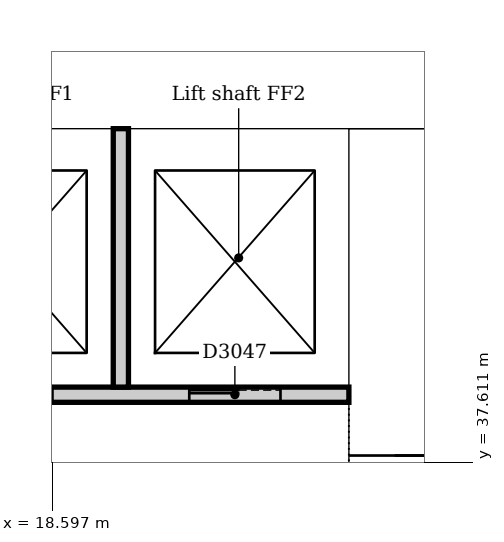
"""IFC4 building model, lengths in metres.
Left out: names, types, materials, properties, quantities, classifications, styles, units other than length and angle.
Written with IfcOpenShell. Run it as: python <this file> out.ifc"""

import sys

from ifc_helpers import new_model, si_unit, direction, frame, frame_2d, origin, place, context, subcontext, project, spatial, rectangle, extrude, element, fill, save


model = new_model("IFC4")
c1 = context("Model", 3, precision=1e-05, world=origin(), true_north=direction((0.0, 1.0)))
c2 = subcontext(c1, "Body", "Model", "MODEL_VIEW")
j1 = project(units=[si_unit("LENGTHUNIT", "METRE"), si_unit("PLANEANGLEUNIT", "RADIAN")], contexts=[c1])
p1 = place(None, origin())
s1 = spatial("IfcSite", under=j1, at=p1, CompositionType="ELEMENT")
p2 = place(p1, origin())
s2 = spatial("IfcBuilding", under=s1, at=p2, CompositionType="ELEMENT")
p3 = place(p2, frame((0.0, 0.0, -5.0)))
s3 = spatial("IfcBuildingStorey", under=s2, at=p3, CompositionType="ELEMENT", Elevation=-5.0)
p4 = place(p3, frame((23.7, 42.6, 0.0), z_axis=(0.0, 0.0, 1.0), x_axis=(-1.0, 0.0, 0.0)))
e1 = element("IfcWall", 1, at=p4, inside=s3, PredefinedType="SOLIDWALL", context=c2, shape_type="SweptSolid", body=[
    extrude(rectangle(XDim=19.8, YDim=1.2, at=frame_2d((9.9, 0.0))), origin(), (0.0, 0.0, 1.0), 5.0),
])
p5 = place(p3, frame((23.1, 31.5, 0.0), z_axis=(0.0, 0.0, 1.0), x_axis=(0.0, 1.0, 0.0)))
e2 = element("IfcWall", 2, at=p5, inside=s3, PredefinedType="SOLIDWALL", context=c2, shape_type="SweptSolid", body=[
    extrude(rectangle(XDim=10.5, YDim=1.2, at=frame_2d((5.25, 0.0))), origin(), (0.0, 0.0, 1.0), 5.0),
])
p6 = place(p5, frame((3.15, 0.0, 0.0)))
e3 = element("IfcOpeningElement", 3, at=p6, cuts=e2, PredefinedType="OPENING", context=c2, shape_type="SweptSolid", body=[
    extrude(rectangle(XDim=1.0, YDim=2.1, at=frame_2d((0.5, 1.05))), frame((0.0, 0.61, 0.0), z_axis=(0.0, -1.0, 0.0), x_axis=(1.0, 0.0, 0.0)), (0.0, 0.0, 1.0), 1.22),
])
p7 = place(p5, frame((5.2, 0.0, 0.0)))
e4 = element("IfcOpeningElement", 4, at=p7, cuts=e2, PredefinedType="OPENING", context=c2, shape_type="SweptSolid", body=[
    extrude(rectangle(XDim=1.0, YDim=2.1, at=frame_2d((0.5, 1.05))), frame((0.0, 0.61, 0.0), z_axis=(0.0, -1.0, 0.0), x_axis=(1.0, 0.0, 0.0)), (0.0, 0.0, 1.0), 1.22),
])
p8 = place(p3, frame((16.4, 38.5, 0.0), z_axis=(0.0, 0.0, 1.0), x_axis=(1.0, 0.0, 0.0)))
e5 = element("IfcWall", 5, at=p8, inside=s3, PredefinedType="PARTITIONING", context=c2, shape_type="SweptSolid", body=[
    extrude(rectangle(XDim=6.1, YDim=0.2, at=frame_2d((3.05, 0.0))), origin(), (0.0, 0.0, 1.0), 4.7),
])
p9 = place(p8, frame((1.0, 0.0, 0.0)))
e6 = element("IfcOpeningElement", 6, at=p9, cuts=e5, PredefinedType="OPENING", context=c2, shape_type="SweptSolid", body=[
    extrude(rectangle(XDim=1.2, YDim=2.1, at=frame_2d((0.6, 1.05))), frame((0.0, 0.11, 0.0), z_axis=(0.0, -1.0, 0.0), x_axis=(1.0, 0.0, 0.0)), (0.0, 0.0, 1.0), 0.22),
])
p10 = place(p8, frame((4.0, 0.0, 0.0)))
e7 = element("IfcOpeningElement", 7, at=p10, cuts=e5, PredefinedType="OPENING", context=c2, shape_type="SweptSolid", body=[
    extrude(rectangle(XDim=1.2, YDim=2.1, at=frame_2d((0.6, 1.05))), frame((0.0, 0.11, 0.0), z_axis=(0.0, -1.0, 0.0), x_axis=(1.0, 0.0, 0.0)), (0.0, 0.0, 1.0), 0.22),
])
p11 = place(p3, frame((19.5, 38.6, 0.0), z_axis=(0.0, 0.0, 1.0), x_axis=(0.0, 1.0, 0.0)))
e8 = element("IfcWall", 8, at=p11, inside=s3, PredefinedType="PARTITIONING", context=c2, shape_type="SweptSolid", body=[
    extrude(rectangle(XDim=3.4, YDim=0.2, at=frame_2d((1.7, 0.0))), origin(), (0.0, 0.0, 1.0), 4.7),
])
p12 = place(p10, origin())
e9 = element("IfcDoor", 9, at=p12, inside=s3, OperationType="SLIDING_TO_LEFT", PredefinedType="DOOR", context=c2, shape_type="SweptSolid", body=[
    extrude(rectangle(XDim=1.2, YDim=2.1, at=frame_2d((0.6, 1.05))), frame((0.0, 0.025, 0.0), z_axis=(0.0, -1.0, 0.0), x_axis=(1.0, 0.0, 0.0)), (0.0, 0.0, 1.0), 0.05),
])
fill(e7, e9)
p13 = place(p7, frame((1.0, 0.0, 0.0), z_axis=(0.0, 0.0, 1.0), x_axis=(-1.0, 0.0, 0.0)))
e10 = element("IfcDoor", 10, at=p13, inside=s3, OperationType="SINGLE_SWING_LEFT", PredefinedType="DOOR", context=c2, shape_type="SweptSolid", body=[
    extrude(rectangle(XDim=1.0, YDim=2.1, at=frame_2d((0.5, 1.05))), frame((0.0, 0.025, 0.0), z_axis=(0.0, -1.0, 0.0), x_axis=(1.0, 0.0, 0.0)), (0.0, 0.0, 1.0), 0.05),
])
fill(e4, e10)
save(model, sys.argv[1])
